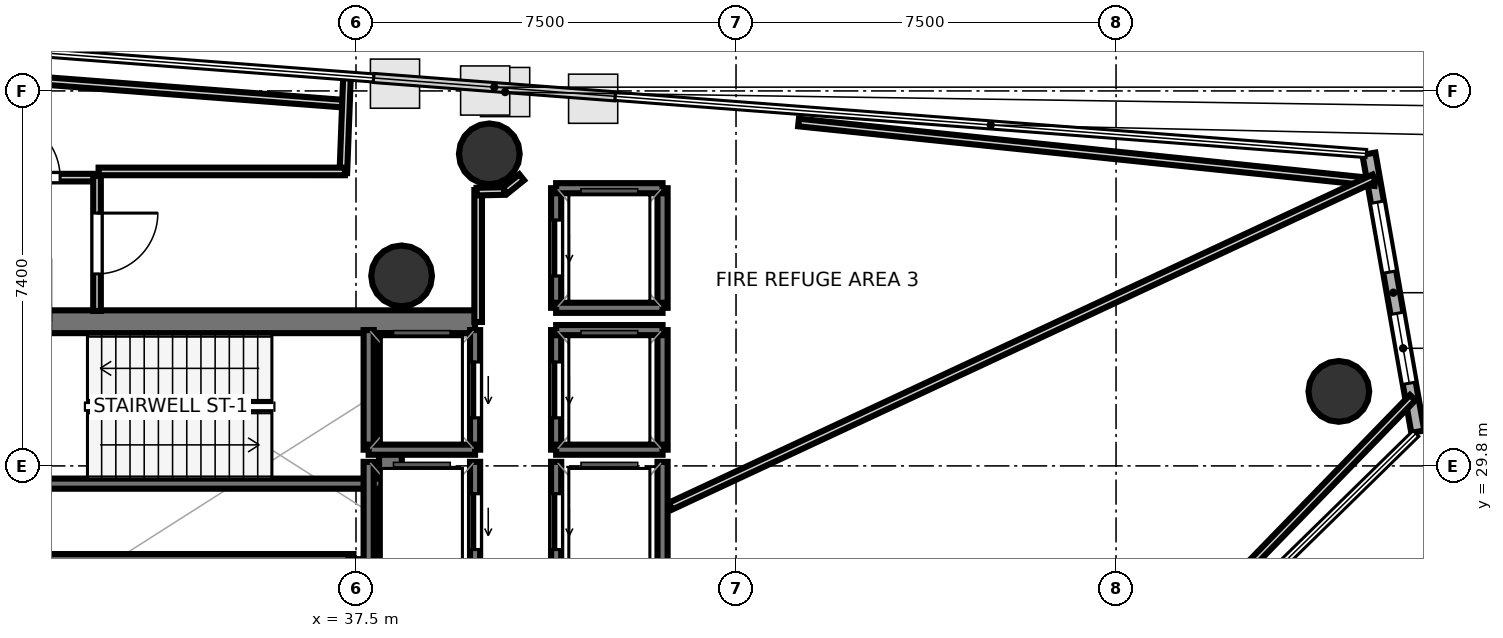
"""IFC4 building model, lengths in metres.
Left out: names, types, materials, properties, quantities, classifications, styles, units other than length and angle.
Written with IfcOpenShell. Run it as: python <this file> out.ifc"""

import sys

from ifc_helpers import new_model, si_unit, direction, frame, frame_2d, origin, origin_2d, place, context, subcontext, project, spatial, rectangle, hollow_circle, extrude, element, fill, save


model = new_model("IFC4")
c1 = context("Model", 3, precision=1e-05, world=origin(), true_north=direction((0.0, 1.0)))
c2 = subcontext(c1, "Body", "Model", "MODEL_VIEW")
j1 = project(units=[si_unit("LENGTHUNIT", "METRE"), si_unit("PLANEANGLEUNIT", "RADIAN")], contexts=[c1])
p1 = place(None, origin())
s1 = spatial("IfcSite", under=j1, at=p1, CompositionType="ELEMENT")
p2 = place(p1, origin())
s2 = spatial("IfcBuilding", under=s1, at=p2, CompositionType="ELEMENT")
p3 = place(p2, frame((0.0, 0.0, 229.9)))
s3 = spatial("IfcBuildingStorey", under=s2, at=p3, CompositionType="ELEMENT", Elevation=229.9)
p4 = place(p3, frame((29.33, 32.645, 0.0), z_axis=(0.0, 0.0, 1.0), x_axis=(1.0, 0.0, 0.0)))
e1 = element("IfcWall", 1, at=p4, inside=s3, PredefinedType="SHEAR", context=c2, shape_type="SweptSolid", body=[
    extrude(rectangle(XDim=10.52, YDim=0.45, at=frame_2d((5.26, 0.0))), origin(), (0.0, 0.0, 1.0), 4.38),
])
p5 = place(p4, frame((0.895, 0.0, 0.0)))
e2 = element("IfcOpeningElement", 2, at=p5, cuts=e1, PredefinedType="OPENING", context=c2, shape_type="SweptSolid", body=[
    extrude(rectangle(XDim=1.25, YDim=2.15, at=frame_2d((0.625, 1.075))), frame((0.0, 0.235, 0.0), z_axis=(0.0, -1.0, 0.0), x_axis=(1.0, 0.0, 0.0)), (0.0, 0.0, 1.0), 0.47),
])
p6 = place(p3, frame((38.18, 24.98, 0.0), z_axis=(0.0, 0.0, 1.0), x_axis=(0.0, 1.0, 0.0)))
e3 = element("IfcWall", 3, at=p6, inside=s3, PredefinedType="SHEAR", context=c2, shape_type="SweptSolid", body=[
    extrude(rectangle(XDim=7.44, YDim=0.45, at=frame_2d((3.72, 0.0))), origin(), (0.0, 0.0, 1.0), 4.38),
])
for number, where, z_axis, x_axis in (
    (4, (38.4, 33.55, 0.0), (0.0, 0.0, 1.0), (1.0, 0.0, 0.0)),
    (5, (56.897, 31.27, 0.0), (0.0, 0.0, 1.0), (1.0, 0.0, 0.0)),
    (6, (40.131, 35.958, 0.0), (0.0, 0.0, 1.0), (1.0, 0.0, 0.0)),
):
    element("IfcColumn", number, at=place(p3, frame(where, z_axis=z_axis, x_axis=x_axis)), inside=s3, PredefinedType="COLUMN", context=c2, shape_type="SweptSolid", body=[
        extrude(hollow_circle(Radius=0.6, WallThickness=0.03, at=origin_2d()), origin(), (0.0, 0.0, 1.0), 4.6),
    ])
p7 = place(p3, frame((58.455, 30.475, 0.0), z_axis=(0.0, 0.0, 1.0), x_axis=(-0.173235165229, 0.984880488957, 0.0)))
e7 = element("IfcWall", 7, at=p7, inside=s3, PredefinedType="SOLIDWALL", context=c2, shape_type="SweptSolid", body=[
    extrude(rectangle(XDim=5.57, YDim=0.26, at=frame_2d((2.785, 0.0))), origin(), (0.0, 0.0, 1.0), 4.38),
])
p8 = place(p7, frame((0.971, 0.0, 1.0)))
e8 = element("IfcOpeningElement", 8, at=p8, cuts=e7, PredefinedType="OPENING", context=c2, shape_type="SweptSolid", body=[
    extrude(rectangle(XDim=1.4, YDim=1.5, at=frame_2d((0.7, 0.75))), frame((0.0, 0.14, 0.0), z_axis=(0.0, -1.0, 0.0), x_axis=(1.0, 0.0, 0.0)), (0.0, 0.0, 1.0), 0.28),
])
p9 = place(p7, frame((3.198, 0.0, 1.0)))
e9 = element("IfcOpeningElement", 9, at=p9, cuts=e7, PredefinedType="OPENING", context=c2, shape_type="SweptSolid", body=[
    extrude(rectangle(XDim=1.4, YDim=1.5, at=frame_2d((0.7, 0.75))), frame((0.0, 0.14, 0.0), z_axis=(0.0, -1.0, 0.0), x_axis=(1.0, 0.0, 0.0)), (0.0, 0.0, 1.0), 0.28),
])
p10 = place(p3, frame((29.7, 29.45, 0.0), z_axis=(0.0, 0.0, 1.0), x_axis=(1.0, 0.0, 0.0)))
e10 = element("IfcWall", 10, at=p10, inside=s3, PredefinedType="SOLIDWALL", context=c2, shape_type="SweptSolid", body=[
    extrude(rectangle(XDim=8.3, YDim=0.2, at=frame_2d((4.15, 0.0))), origin(), (0.0, 0.0, 1.0), 4.38),
])
p11 = place(p3, frame((29.7, 27.96, 0.0), z_axis=(0.0, 0.0, 1.0), x_axis=(1.0, 0.0, 0.0)))
e11 = element("IfcWall", 11, at=p11, inside=s3, PredefinedType="SOLIDWALL", context=c2, shape_type="SweptSolid", body=[
    extrude(rectangle(XDim=7.75, YDim=0.2, at=frame_2d((3.875, 0.0))), origin(), (0.0, 0.0, 1.0), 4.38),
])
p12 = place(p3, frame((39.85, 30.12, 0.0), z_axis=(0.0, 0.0, 1.0), x_axis=(0.0, 1.0, 0.0)))
e12 = element("IfcWall", 12, at=p12, inside=s3, PredefinedType="SOLIDWALL", context=c2, shape_type="SweptSolid", body=[
    extrude(rectangle(XDim=2.36, YDim=0.2, at=frame_2d((1.18, 0.0))), origin(), (0.0, 0.0, 1.0), 4.38),
])
p13 = place(p12, frame((0.63, 0.0, 0.0)))
e13 = element("IfcOpeningElement", 13, at=p13, cuts=e12, PredefinedType="OPENING", context=c2, shape_type="SweptSolid", body=[
    extrude(rectangle(XDim=1.1, YDim=2.15, at=frame_2d((0.55, 1.075))), frame((0.0, 0.11, 0.0), z_axis=(0.0, -1.0, 0.0), x_axis=(1.0, 0.0, 0.0)), (0.0, 0.0, 1.0), 0.22),
])
p14 = place(p3, frame((37.75, 30.12, 0.0), z_axis=(0.0, 0.0, 1.0), x_axis=(0.0, 1.0, 0.0)))
e14 = element("IfcWall", 14, at=p14, inside=s3, PredefinedType="SOLIDWALL", context=c2, shape_type="SweptSolid", body=[
    extrude(rectangle(XDim=2.36, YDim=0.2, at=frame_2d((1.18, 0.0))), origin(), (0.0, 0.0, 1.0), 4.38),
])
p15 = place(p3, frame((37.75, 30.12, 0.0), z_axis=(0.0, 0.0, 1.0), x_axis=(1.0, 0.0, 0.0)))
e15 = element("IfcWall", 15, at=p15, inside=s3, PredefinedType="SOLIDWALL", context=c2, shape_type="SweptSolid", body=[
    extrude(rectangle(XDim=2.1, YDim=0.2, at=frame_2d((1.05, 0.0))), origin(), (0.0, 0.0, 1.0), 4.38),
])
p16 = place(p3, frame((43.55, 30.12, 0.0), z_axis=(0.0, 0.0, 1.0), x_axis=(0.0, 1.0, 0.0)))
e16 = element("IfcWall", 16, at=p16, inside=s3, PredefinedType="SOLIDWALL", context=c2, shape_type="SweptSolid", body=[
    extrude(rectangle(XDim=2.36, YDim=0.2, at=frame_2d((1.18, 0.0))), origin(), (0.0, 0.0, 1.0), 4.38),
])
p17 = place(p3, frame((41.45, 30.12, 0.0), z_axis=(0.0, 0.0, 1.0), x_axis=(0.0, 1.0, 0.0)))
e17 = element("IfcWall", 17, at=p17, inside=s3, PredefinedType="SOLIDWALL", context=c2, shape_type="SweptSolid", body=[
    extrude(rectangle(XDim=2.36, YDim=0.2, at=frame_2d((1.18, 0.0))), origin(), (0.0, 0.0, 1.0), 4.38),
])
p18 = place(p17, frame((0.63, 0.0, 0.0)))
e18 = element("IfcOpeningElement", 18, at=p18, cuts=e17, PredefinedType="OPENING", context=c2, shape_type="SweptSolid", body=[
    extrude(rectangle(XDim=1.1, YDim=2.15, at=frame_2d((0.55, 1.075))), frame((0.0, 0.11, 0.0), z_axis=(0.0, -1.0, 0.0), x_axis=(1.0, 0.0, 0.0)), (0.0, 0.0, 1.0), 0.22),
])
for number, where, z_axis, x_axis in (
    (19, (41.45, 32.48, 0.0), (0.0, 0.0, 1.0), (1.0, 0.0, 0.0)),
    (20, (41.45, 30.12, 0.0), (0.0, 0.0, 1.0), (1.0, 0.0, 0.0)),
):
    element("IfcWall", number, at=place(p3, frame(where, z_axis=z_axis, x_axis=x_axis)), inside=s3, PredefinedType="SOLIDWALL", context=c2, shape_type="SweptSolid", body=[
        extrude(rectangle(XDim=2.1, YDim=0.2, at=frame_2d((1.05, 0.0))), origin(), (0.0, 0.0, 1.0), 4.38),
    ])
p19 = place(p3, frame((43.55, 27.52, 0.0), z_axis=(0.0, 0.0, 1.0), x_axis=(0.0, 1.0, 0.0)))
e21 = element("IfcWall", 21, at=p19, inside=s3, PredefinedType="SOLIDWALL", context=c2, shape_type="SweptSolid", body=[
    extrude(rectangle(XDim=2.36, YDim=0.2, at=frame_2d((1.18, 0.0))), origin(), (0.0, 0.0, 1.0), 4.38),
])
p20 = place(p3, frame((41.45, 27.52, 0.0), z_axis=(0.0, 0.0, 1.0), x_axis=(0.0, 1.0, 0.0)))
e22 = element("IfcWall", 22, at=p20, inside=s3, PredefinedType="SOLIDWALL", context=c2, shape_type="SweptSolid", body=[
    extrude(rectangle(XDim=2.36, YDim=0.2, at=frame_2d((1.18, 0.0))), origin(), (0.0, 0.0, 1.0), 4.38),
])
p21 = place(p20, frame((0.63, 0.0, 0.0)))
e23 = element("IfcOpeningElement", 23, at=p21, cuts=e22, PredefinedType="OPENING", context=c2, shape_type="SweptSolid", body=[
    extrude(rectangle(XDim=1.1, YDim=2.15, at=frame_2d((0.55, 1.075))), frame((0.0, 0.11, 0.0), z_axis=(0.0, -1.0, 0.0), x_axis=(1.0, 0.0, 0.0)), (0.0, 0.0, 1.0), 0.22),
])
p22 = place(p3, frame((39.85, 27.52, 0.0), z_axis=(0.0, 0.0, 1.0), x_axis=(0.0, 1.0, 0.0)))
e24 = element("IfcWall", 24, at=p22, inside=s3, PredefinedType="SOLIDWALL", context=c2, shape_type="SweptSolid", body=[
    extrude(rectangle(XDim=2.36, YDim=0.2, at=frame_2d((1.18, 0.0))), origin(), (0.0, 0.0, 1.0), 4.38),
])
p23 = place(p22, frame((0.63, 0.0, 0.0)))
e25 = element("IfcOpeningElement", 25, at=p23, cuts=e24, PredefinedType="OPENING", context=c2, shape_type="SweptSolid", body=[
    extrude(rectangle(XDim=1.1, YDim=2.15, at=frame_2d((0.55, 1.075))), frame((0.0, 0.11, 0.0), z_axis=(0.0, -1.0, 0.0), x_axis=(1.0, 0.0, 0.0)), (0.0, 0.0, 1.0), 0.22),
])
p24 = place(p3, frame((37.75, 27.52, 0.0), z_axis=(0.0, 0.0, 1.0), x_axis=(0.0, 1.0, 0.0)))
e26 = element("IfcWall", 26, at=p24, inside=s3, PredefinedType="SOLIDWALL", context=c2, shape_type="SweptSolid", body=[
    extrude(rectangle(XDim=2.36, YDim=0.2, at=frame_2d((1.18, 0.0))), origin(), (0.0, 0.0, 1.0), 4.38),
])
p25 = place(p3, frame((43.55, 32.92, 0.0), z_axis=(0.0, 0.0, 1.0), x_axis=(0.0, 1.0, 0.0)))
e27 = element("IfcWall", 27, at=p25, inside=s3, PredefinedType="SOLIDWALL", context=c2, shape_type="SweptSolid", body=[
    extrude(rectangle(XDim=2.36, YDim=0.2, at=frame_2d((1.18, 0.0))), origin(), (0.0, 0.0, 1.0), 4.38),
])
p26 = place(p3, frame((41.45, 32.92, 0.0), z_axis=(0.0, 0.0, 1.0), x_axis=(0.0, 1.0, 0.0)))
e28 = element("IfcWall", 28, at=p26, inside=s3, PredefinedType="SOLIDWALL", context=c2, shape_type="SweptSolid", body=[
    extrude(rectangle(XDim=2.36, YDim=0.2, at=frame_2d((1.18, 0.0))), origin(), (0.0, 0.0, 1.0), 4.38),
])
p27 = place(p26, frame((0.63, 0.0, 0.0)))
e29 = element("IfcOpeningElement", 29, at=p27, cuts=e28, PredefinedType="OPENING", context=c2, shape_type="SweptSolid", body=[
    extrude(rectangle(XDim=1.1, YDim=2.15, at=frame_2d((0.55, 1.075))), frame((0.0, 0.11, 0.0), z_axis=(0.0, -1.0, 0.0), x_axis=(1.0, 0.0, 0.0)), (0.0, 0.0, 1.0), 0.22),
])
for number, where, z_axis, x_axis in (
    (30, (41.45, 35.28, 0.0), (0.0, 0.0, 1.0), (1.0, 0.0, 0.0)),
    (31, (41.45, 32.92, 0.0), (0.0, 0.0, 1.0), (1.0, 0.0, 0.0)),
):
    element("IfcWall", number, at=place(p3, frame(where, z_axis=z_axis, x_axis=x_axis)), inside=s3, PredefinedType="SOLIDWALL", context=c2, shape_type="SweptSolid", body=[
        extrude(rectangle(XDim=2.1, YDim=0.2, at=frame_2d((1.05, 0.0))), origin(), (0.0, 0.0, 1.0), 4.38),
    ])
p28 = place(p3, frame((29.7, 35.489, 0.0), z_axis=(0.0, 0.0, 1.0), x_axis=(1.0, 0.0, 0.0)))
e32 = element("IfcWall", 32, at=p28, inside=s3, PredefinedType="PARTITIONING", context=c2, shape_type="SweptSolid", body=[
    extrude(rectangle(XDim=2.72, YDim=0.15, at=frame_2d((1.36, 0.0))), origin(), (0.0, 0.0, 1.0), 2.9),
])
p29 = place(p28, frame((0.76, 0.0, 0.0)))
e33 = element("IfcOpeningElement", 33, at=p29, cuts=e32, PredefinedType="OPENING", context=c2, shape_type="SweptSolid", body=[
    extrude(rectangle(XDim=1.2, YDim=2.15, at=frame_2d((0.6, 1.075))), frame((0.0, 0.085, 0.0), z_axis=(0.0, -1.0, 0.0), x_axis=(1.0, 0.0, 0.0)), (0.0, 0.0, 1.0), 0.17),
])
p30 = place(p3, frame((32.389, 35.52, 0.0), z_axis=(0.0, 0.0, 1.0), x_axis=(0.0, -1.0, 0.0)))
e34 = element("IfcWall", 34, at=p30, inside=s3, PredefinedType="PARTITIONING", context=c2, shape_type="SweptSolid", body=[
    extrude(rectangle(XDim=2.662, YDim=0.15, at=frame_2d((1.331, 0.0))), origin(), (0.0, 0.0, 1.0), 2.9),
])
p31 = place(p30, frame((0.731, 0.0, 0.0)))
e35 = element("IfcOpeningElement", 35, at=p31, cuts=e34, PredefinedType="OPENING", context=c2, shape_type="SweptSolid", body=[
    extrude(rectangle(XDim=1.2, YDim=2.15, at=frame_2d((0.6, 1.075))), frame((0.0, 0.085, 0.0), z_axis=(0.0, -1.0, 0.0), x_axis=(1.0, 0.0, 0.0)), (0.0, 0.0, 1.0), 0.17),
])
p32 = place(p3, frame((39.911, 32.64, 0.0), z_axis=(0.0, 0.0, 1.0), x_axis=(0.0, 1.0, 0.0)))
e36 = element("IfcWall", 36, at=p32, inside=s3, PredefinedType="PARTITIONING", context=c2, shape_type="SweptSolid", body=[
    extrude(rectangle(XDim=2.604, YDim=0.15, at=frame_2d((1.302, 0.0))), origin(), (0.0, 0.0, 1.0), 2.9),
])
p33 = place(p3, frame((39.881, 35.213, 0.0), z_axis=(0.0, 0.0, 1.0), x_axis=(0.999756500784, 0.02206669754, 0.0)))
e37 = element("IfcWall", 37, at=p33, inside=s3, PredefinedType="PARTITIONING", context=c2, shape_type="SweptSolid", body=[
    extrude(rectangle(XDim=0.542, YDim=0.15, at=frame_2d((0.271, 0.0))), origin(), (0.0, 0.0, 1.0), 2.9),
])
p34 = place(p3, frame((40.441, 35.232, 0.0), z_axis=(0.0, 0.0, 1.0), x_axis=(0.778714564707, 0.627378376033, 0.0)))
e38 = element("IfcWall", 38, at=p34, inside=s3, PredefinedType="PARTITIONING", context=c2, shape_type="SweptSolid", body=[
    extrude(rectangle(XDim=0.421, YDim=0.15, at=frame_2d((0.21, 0.0))), origin(), (0.0, 0.0, 1.0), 2.9),
])
p35 = place(p3, frame((27.322, 37.704, 0.0), z_axis=(0.0, 0.0, 1.0), x_axis=(0.997115114971, -0.075904199464, 0.0)))
e39 = element("IfcWall", 39, at=p35, inside=s3, PredefinedType="PARTITIONING", context=c2, shape_type="SweptSolid", body=[
    extrude(rectangle(XDim=10.039, YDim=0.15, at=frame_2d((5.019, 0.0))), origin(), (0.0, 0.0, 1.0), 2.9),
])
p36 = place(p3, frame((37.323, 37.516, 0.0), z_axis=(0.0, 0.0, 1.0), x_axis=(-0.03796327397, -0.999279135092, 0.0)))
e40 = element("IfcWall", 40, at=p36, inside=s3, PredefinedType="PARTITIONING", context=c2, shape_type="SweptSolid", body=[
    extrude(rectangle(XDim=1.936, YDim=0.15, at=frame_2d((0.968, 0.0))), origin(), (0.0, 0.0, 1.0), 2.9),
])
p37 = place(p3, frame((37.281, 35.611, 0.0), z_axis=(0.0, 0.0, 1.0), x_axis=(-0.999999994955, 0.000100446989, 0.0)))
e41 = element("IfcWall", 41, at=p37, inside=s3, PredefinedType="PARTITIONING", context=c2, shape_type="SweptSolid", body=[
    extrude(rectangle(XDim=4.861, YDim=0.15, at=frame_2d((2.431, 0.0))), origin(), (0.0, 0.0, 1.0), 2.9),
])
p38 = place(p3, frame((46.233, 36.577, 0.0), z_axis=(0.0, 0.0, 1.0), x_axis=(0.994680787495, -0.103005490088, 0.0)))
e42 = element("IfcWall", 42, at=p38, inside=s3, PredefinedType="PARTITIONING", context=c2, shape_type="SweptSolid", body=[
    extrude(rectangle(XDim=11.436, YDim=0.15, at=frame_2d((5.718, 0.0))), origin(), (0.0, 0.0, 1.0), 2.9),
])
p39 = place(p3, frame((57.594, 35.481, 0.0), z_axis=(0.0, 0.0, 1.0), x_axis=(-0.906310912914, -0.42261155821, 0.0)))
e43 = element("IfcWall", 43, at=p39, inside=s3, PredefinedType="PARTITIONING", context=c2, shape_type="SweptSolid", body=[
    extrude(rectangle(XDim=15.323, YDim=0.15, at=frame_2d((7.661, 0.0))), origin(), (0.0, 0.0, 1.0), 2.9),
])
p40 = place(p3, frame((58.354, 31.147, 0.0), z_axis=(0.0, 0.0, 1.0), x_axis=(-0.69662095265, -0.717439369096, 0.0)))
e44 = element("IfcWall", 44, at=p40, inside=s3, PredefinedType="PARTITIONING", context=c2, shape_type="SweptSolid", body=[
    extrude(rectangle(XDim=11.962, YDim=0.15, at=frame_2d((5.981, 0.0))), origin(), (0.0, 0.0, 1.0), 2.9),
])
p41 = place(p13, origin())
e45 = element("IfcDoor", 45, at=p41, inside=s3, OperationType="SLIDING_TO_LEFT", PredefinedType="DOOR", context=c2, shape_type="SweptSolid", body=[
    extrude(rectangle(XDim=1.1, YDim=2.15, at=frame_2d((0.55, 1.075))), frame((0.0, 0.025, 0.0), z_axis=(0.0, -1.0, 0.0), x_axis=(1.0, 0.0, 0.0)), (0.0, 0.0, 1.0), 0.05),
])
fill(e13, e45)
p42 = place(p18, origin())
e46 = element("IfcDoor", 46, at=p42, inside=s3, OperationType="SLIDING_TO_LEFT", PredefinedType="DOOR", context=c2, shape_type="SweptSolid", body=[
    extrude(rectangle(XDim=1.1, YDim=2.15, at=frame_2d((0.55, 1.075))), frame((0.0, 0.025, 0.0), z_axis=(0.0, -1.0, 0.0), x_axis=(1.0, 0.0, 0.0)), (0.0, 0.0, 1.0), 0.05),
])
fill(e18, e46)
p43 = place(p21, origin())
e47 = element("IfcDoor", 47, at=p43, inside=s3, OperationType="SLIDING_TO_LEFT", PredefinedType="DOOR", context=c2, shape_type="SweptSolid", body=[
    extrude(rectangle(XDim=1.1, YDim=2.15, at=frame_2d((0.55, 1.075))), frame((0.0, 0.025, 0.0), z_axis=(0.0, -1.0, 0.0), x_axis=(1.0, 0.0, 0.0)), (0.0, 0.0, 1.0), 0.05),
])
fill(e23, e47)
p44 = place(p23, origin())
e48 = element("IfcDoor", 48, at=p44, inside=s3, OperationType="SLIDING_TO_LEFT", PredefinedType="DOOR", context=c2, shape_type="SweptSolid", body=[
    extrude(rectangle(XDim=1.1, YDim=2.15, at=frame_2d((0.55, 1.075))), frame((0.0, 0.025, 0.0), z_axis=(0.0, -1.0, 0.0), x_axis=(1.0, 0.0, 0.0)), (0.0, 0.0, 1.0), 0.05),
])
fill(e25, e48)
p45 = place(p27, origin())
e49 = element("IfcDoor", 49, at=p45, inside=s3, OperationType="SLIDING_TO_LEFT", PredefinedType="DOOR", context=c2, shape_type="SweptSolid", body=[
    extrude(rectangle(XDim=1.1, YDim=2.15, at=frame_2d((0.55, 1.075))), frame((0.0, 0.025, 0.0), z_axis=(0.0, -1.0, 0.0), x_axis=(1.0, 0.0, 0.0)), (0.0, 0.0, 1.0), 0.05),
])
fill(e29, e49)
p46 = place(p29, origin())
e50 = element("IfcDoor", 50, at=p46, inside=s3, OperationType="SINGLE_SWING_LEFT", PredefinedType="DOOR", context=c2, shape_type="SweptSolid", body=[
    extrude(rectangle(XDim=1.2, YDim=2.15, at=frame_2d((0.6, 1.075))), frame((0.0, 0.025, 0.0), z_axis=(0.0, -1.0, 0.0), x_axis=(1.0, 0.0, 0.0)), (0.0, 0.0, 1.0), 0.05),
])
fill(e33, e50)
p47 = place(p31, origin())
e51 = element("IfcDoor", 51, at=p47, inside=s3, OperationType="SINGLE_SWING_LEFT", PredefinedType="DOOR", context=c2, shape_type="SweptSolid", body=[
    extrude(rectangle(XDim=1.2, YDim=2.15, at=frame_2d((0.6, 1.075))), frame((0.0, 0.025, 0.0), z_axis=(0.0, -1.0, 0.0), x_axis=(1.0, 0.0, 0.0)), (0.0, 0.0, 1.0), 0.05),
])
fill(e35, e51)
p48 = place(p8, origin())
e52 = element("IfcWindow", 52, at=p48, inside=s3, PartitioningType="SINGLE_PANEL", PredefinedType="WINDOW", context=c2, shape_type="SweptSolid", body=[
    extrude(rectangle(XDim=1.4, YDim=1.5, at=frame_2d((0.7, 0.75))), frame((0.0, 0.03, 0.0), z_axis=(0.0, -1.0, 0.0), x_axis=(1.0, 0.0, 0.0)), (0.0, 0.0, 1.0), 0.06),
])
fill(e8, e52)
p49 = place(p9, origin())
e53 = element("IfcWindow", 53, at=p49, inside=s3, PartitioningType="SINGLE_PANEL", PredefinedType="WINDOW", context=c2, shape_type="SweptSolid", body=[
    extrude(rectangle(XDim=1.4, YDim=1.5, at=frame_2d((0.7, 0.75))), frame((0.0, 0.03, 0.0), z_axis=(0.0, -1.0, 0.0), x_axis=(1.0, 0.0, 0.0)), (0.0, 0.0, 1.0), 0.06),
])
fill(e9, e53)
save(model, sys.argv[1])
